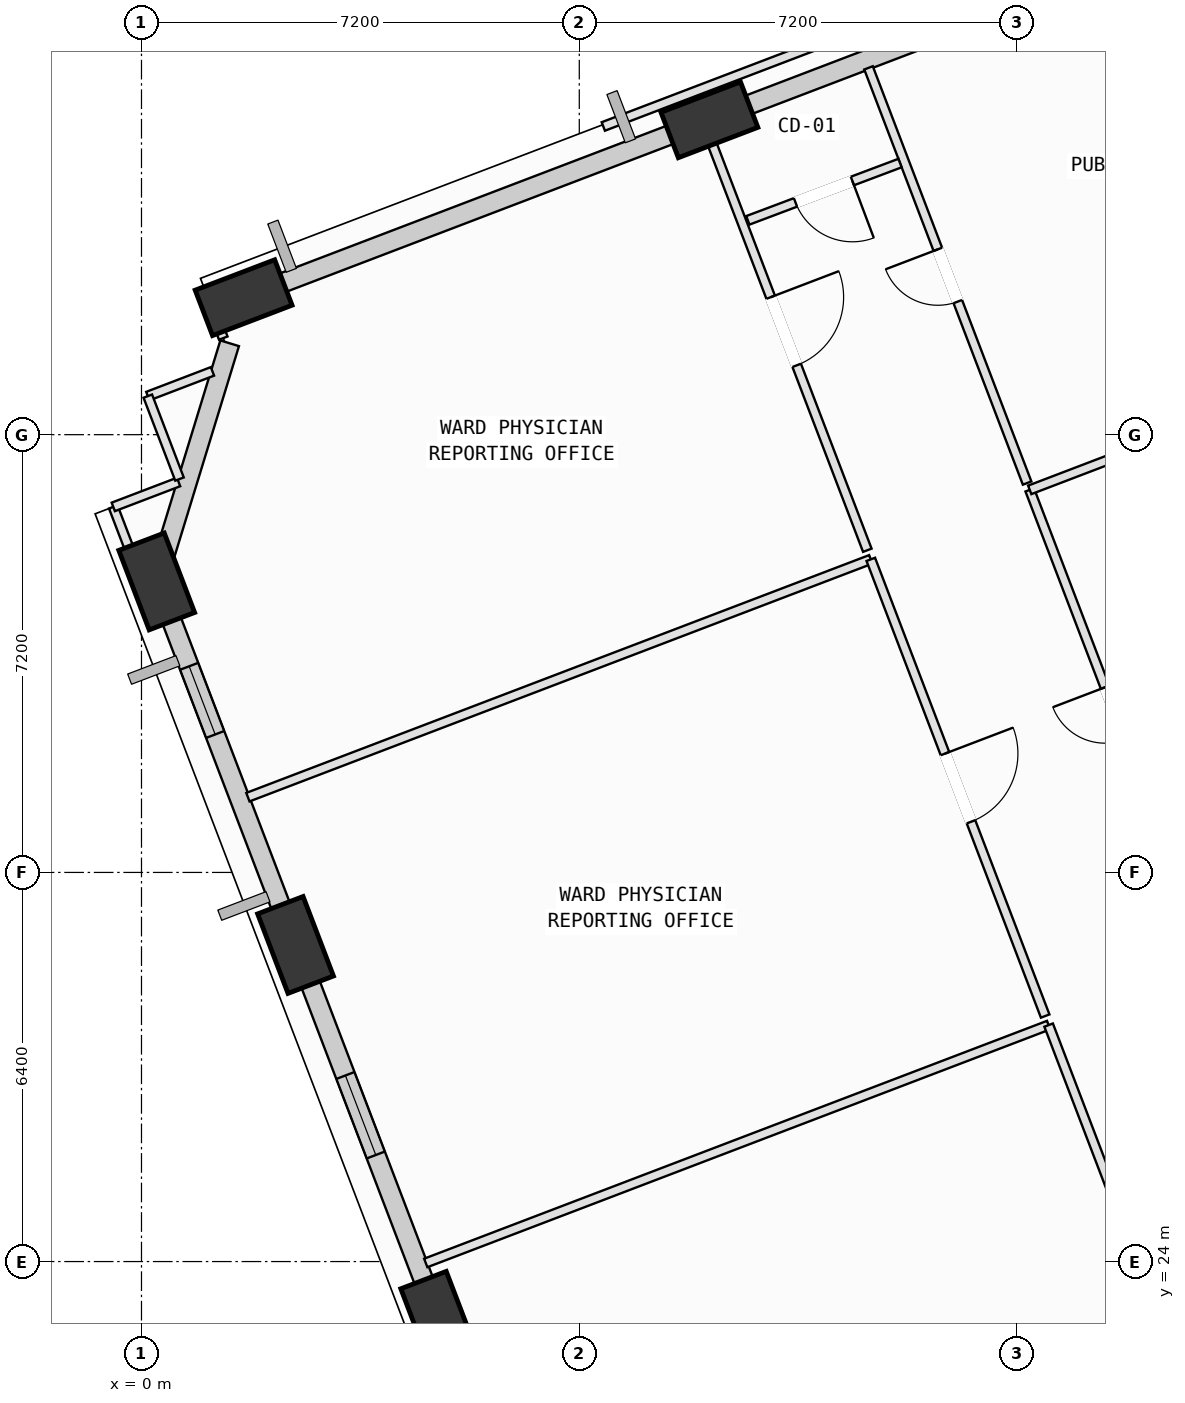
"""IFC4 building model, lengths in metres.
Left out: names, types, materials, properties, quantities, classifications, styles, units other than length and angle.
Written with IfcOpenShell. Run it as: python <this file> out.ifc"""

import sys

from ifc_helpers import new_model, si_unit, direction, frame, frame_2d, origin, origin_2d, place, context, subcontext, project, spatial, rectangle, extrude, element, fill, save


model = new_model("IFC4")
c1 = context("Model", 3, precision=1e-05, world=origin(), true_north=direction((0.0, 1.0)))
c2 = subcontext(c1, "Body", "Model", "MODEL_VIEW")
j1 = project(units=[si_unit("LENGTHUNIT", "METRE"), si_unit("PLANEANGLEUNIT", "RADIAN")], contexts=[c1])
p1 = place(None, origin())
s1 = spatial("IfcSite", under=j1, at=p1, CompositionType="ELEMENT")
p2 = place(p1, origin())
s2 = spatial("IfcBuilding", under=s1, at=p2, CompositionType="ELEMENT")
p3 = place(p2, frame((0.0, 0.0, 112.4)))
s3 = spatial("IfcBuildingStorey", under=s2, at=p3, CompositionType="ELEMENT", Elevation=112.4)
p4 = place(p3, frame((9.34, 42.778, 0.002), z_axis=(-0.07310555409, -0.100383745915, 0.992259382176), x_axis=(0.963553675807, -0.263821466154, 0.044300652763)))
e1 = element("IfcColumn", 1, at=p4, inside=s3, PredefinedType="COLUMN", context=c2, shape_type="SweptSolid", body=[
    extrude(rectangle(XDim=1.4, YDim=0.8, at=origin_2d()), origin(), (0.0, 0.0, 1.0), 4.028),
])
p5 = place(p3, frame((1.68, 39.853, 0.002), z_axis=(-0.060689479062, -0.131413274383, 0.989468209922), x_axis=(0.996122663983, -0.071226123584, 0.05163794746)))
e2 = element("IfcColumn", 2, at=p5, inside=s3, PredefinedType="COLUMN", context=c2, shape_type="SweptSolid", body=[
    extrude(rectangle(XDim=1.4, YDim=0.8, at=origin_2d()), origin(), (0.0, 0.0, 1.0), 4.039),
])
p6 = place(p3, frame((0.25, 35.186, 0.002), z_axis=(-0.041476198525, -0.137125391043, 0.989684976185), x_axis=(-0.07378339726, 0.988253126916, 0.133834851324)))
e3 = element("IfcColumn", 3, at=p6, inside=s3, PredefinedType="COLUMN", context=c2, shape_type="SweptSolid", body=[
    extrude(rectangle(XDim=1.4, YDim=0.8, at=origin_2d()), origin(), (0.0, 0.0, 1.0), 4.038),
])
p7 = place(p3, frame((2.534, 29.207, 0.002), z_axis=(-0.017083694173, -0.127885384397, 0.991641808241), x_axis=(-0.230933041621, 0.965474948457, 0.120532378182)))
e4 = element("IfcColumn", 4, at=p7, inside=s3, PredefinedType="COLUMN", context=c2, shape_type="SweptSolid", body=[
    extrude(rectangle(XDim=1.4, YDim=0.8, at=origin_2d()), origin(), (0.0, 0.0, 1.0), 4.03),
])
p8 = place(p3, frame((4.888, 23.042, 0.002), z_axis=(0.008189293553, -0.118107811468, 0.992967008687), x_axis=(-0.420049262913, 0.900736291816, 0.110601760074)))
e5 = element("IfcColumn", 5, at=p8, inside=s3, PredefinedType="COLUMN", context=c2, shape_type="SweptSolid", body=[
    extrude(rectangle(XDim=1.4, YDim=0.8, at=origin_2d()), origin(), (0.0, 0.0, 1.0), 4.025),
])
p9 = place(p3, frame((9.59, 42.874, 0.0), z_axis=(0.0, 0.0, 1.0), x_axis=(0.934201815153, 0.356744962915, 0.0)))
e6 = element("IfcWall", 6, at=p9, inside=s3, PredefinedType="SOLIDWALL", context=c2, shape_type="SweptSolid", body=[
    extrude(rectangle(XDim=7.231, YDim=0.32, at=frame_2d((3.615, 0.0))), origin(), (0.0, 0.0, 1.0), 3.165),
])
p10 = place(p3, frame((1.906, 39.94, 0.0), z_axis=(0.0, 0.0, 1.0), x_axis=(0.934209230199, 0.356725544658, 0.0)))
e7 = element("IfcWall", 7, at=p10, inside=s3, PredefinedType="SOLIDWALL", context=c2, shape_type="SweptSolid", body=[
    extrude(rectangle(XDim=7.27, YDim=0.32, at=frame_2d((3.635, 0.0))), origin(), (0.0, 0.0, 1.0), 3.165),
])
p11 = place(p3, frame((0.311, 35.384, 0.0), z_axis=(0.0, 0.0, 1.0), x_axis=(0.292819682906, 0.956167680537, 0.0)))
e8 = element("IfcWall", 8, at=p11, inside=s3, PredefinedType="SOLIDWALL", context=c2, shape_type="SweptSolid", body=[
    extrude(rectangle(XDim=3.889, YDim=0.32, at=frame_2d((1.945, 0.0))), origin(), (0.0, 0.0, 1.0), 3.165),
])
p12 = place(p3, frame((2.444, 29.443, 0.0), z_axis=(0.0, 0.0, 1.0), x_axis=(-0.356747012413, 0.934201032506, 0.0)))
e9 = element("IfcWall", 9, at=p12, inside=s3, PredefinedType="SOLIDWALL", context=c2, shape_type="SweptSolid", body=[
    extrude(rectangle(XDim=5.456, YDim=0.32, at=frame_2d((2.728, 0.0))), origin(), (0.0, 0.0, 1.0), 3.165),
])
p13 = place(p12, frame((3.454, 0.0, 0.75)))
e10 = element("IfcOpeningElement", 10, at=p13, cuts=e9, PredefinedType="OPENING", context=c2, shape_type="SweptSolid", body=[
    extrude(rectangle(XDim=1.2, YDim=1.75, at=frame_2d((0.6, 0.875))), frame((0.0, 0.17, 0.0), z_axis=(0.0, -1.0, 0.0), x_axis=(1.0, 0.0, 0.0)), (0.0, 0.0, 1.0), 0.34),
])
p14 = place(p3, frame((4.794, 23.288, 0.0), z_axis=(0.0, 0.0, 1.0), x_axis=(-0.356736674648, 0.934204980163, 0.0)))
e11 = element("IfcWall", 11, at=p14, inside=s3, PredefinedType="SOLIDWALL", context=c2, shape_type="SweptSolid", body=[
    extrude(rectangle(XDim=5.628, YDim=0.32, at=frame_2d((2.814, 0.0))), origin(), (0.0, 0.0, 1.0), 3.165),
])
p15 = place(p14, frame((2.638, 0.0, 0.75)))
e12 = element("IfcOpeningElement", 12, at=p15, cuts=e11, PredefinedType="OPENING", context=c2, shape_type="SweptSolid", body=[
    extrude(rectangle(XDim=1.4, YDim=1.85, at=frame_2d((0.7, 0.925))), frame((0.0, 0.17, 0.0), z_axis=(0.0, -1.0, 0.0), x_axis=(1.0, 0.0, 0.0)), (0.0, 0.0, 1.0), 0.34),
])
p16 = place(p3, frame((4.93, 22.287, 0.0), z_axis=(0.0, 0.0, 1.0), x_axis=(-0.356997215176, 0.9341054482, 0.0)))
e13 = element("IfcWall", 13, at=p16, inside=s3, PredefinedType="PARTITIONING", context=c2, shape_type="SweptSolid", body=[
    extrude(rectangle(XDim=0.983, YDim=0.15, at=frame_2d((0.491, 0.0))), origin(), (0.0, 0.0, 1.0), 3.165),
])
p17 = place(p3, frame((4.675, 23.977, 0.0), z_axis=(0.0, 0.0, 1.0), x_axis=(0.934201387947, 0.356746081629, 0.0)))
e14 = element("IfcWall", 14, at=p17, inside=s3, PredefinedType="PARTITIONING", context=c2, shape_type="SweptSolid", body=[
    extrude(rectangle(XDim=10.965, YDim=0.15, at=frame_2d((5.483, 0.0))), origin(), (0.0, 0.0, 1.0), 3.78),
])
p18 = place(p3, frame((14.919, 27.889, 0.0), z_axis=(0.0, 0.0, 1.0), x_axis=(0.356742665593, -0.934202692431, 0.0)))
e15 = element("IfcWall", 15, at=p18, inside=s3, PredefinedType="PARTITIONING", context=c2, shape_type="SweptSolid", body=[
    extrude(rectangle(XDim=7.824, YDim=0.15, at=frame_2d((3.912, 0.0))), origin(), (0.0, 0.0, 1.0), 3.78),
])
p19 = place(p18, frame((3.312, 0.0, 0.0)))
e16 = element("IfcOpeningElement", 16, at=p19, cuts=e15, PredefinedType="OPENING", context=c2, shape_type="SweptSolid", body=[
    extrude(rectangle(XDim=1.2, YDim=2.15, at=frame_2d((0.6, 1.075))), frame((0.0, 0.085, 0.0), z_axis=(0.0, -1.0, 0.0), x_axis=(1.0, 0.0, 0.0)), (0.0, 0.0, 1.0), 0.17),
])
p20 = place(p3, frame((1.75, 31.638, 0.0), z_axis=(0.0, 0.0, 1.0), x_axis=(0.934223647232, 0.356687786379, 0.0)))
e17 = element("IfcWall", 17, at=p20, inside=s3, PredefinedType="PARTITIONING", context=c2, shape_type="SweptSolid", body=[
    extrude(rectangle(XDim=10.965, YDim=0.15, at=frame_2d((5.482, 0.0))), origin(), (0.0, 0.0, 1.0), 3.78),
])
p21 = place(p3, frame((11.994, 35.549, 0.0), z_axis=(0.0, 0.0, 1.0), x_axis=(0.356737704726, -0.934204586815, 0.0)))
e18 = element("IfcWall", 18, at=p21, inside=s3, PredefinedType="PARTITIONING", context=c2, shape_type="SweptSolid", body=[
    extrude(rectangle(XDim=8.04, YDim=0.15, at=frame_2d((4.02, 0.0))), origin(), (0.0, 0.0, 1.0), 3.78),
])
p22 = place(p21, frame((3.42, 0.0, 0.0)))
e19 = element("IfcOpeningElement", 19, at=p22, cuts=e18, PredefinedType="OPENING", context=c2, shape_type="SweptSolid", body=[
    extrude(rectangle(XDim=1.2, YDim=2.15, at=frame_2d((0.6, 1.075))), frame((0.0, 0.085, 0.0), z_axis=(0.0, -1.0, 0.0), x_axis=(1.0, 0.0, 0.0)), (0.0, 0.0, 1.0), 0.17),
])
p23 = place(p3, frame((2.572, 28.463, 0.0), z_axis=(0.0, 0.0, 1.0), x_axis=(-0.35676603532, 0.934193767931, 0.0)))
e20 = element("IfcWall", 20, at=p23, inside=s3, PredefinedType="PARTITIONING", context=c2, shape_type="SweptSolid", body=[
    extrude(rectangle(XDim=0.961, YDim=0.15, at=frame_2d((0.481, 0.0))), origin(), (0.0, 0.0, 1.0), 3.165),
])
p24 = place(p3, frame((0.104, 38.234, 0.0), z_axis=(0.0, 0.0, 1.0), x_axis=(0.933820168523, 0.357742774712, 0.0)))
e21 = element("IfcWall", 21, at=p24, inside=s3, PredefinedType="PARTITIONING", context=c2, shape_type="SweptSolid", body=[
    extrude(rectangle(XDim=1.138, YDim=0.15, at=frame_2d((0.569, 0.0))), origin(), (0.0, 0.0, 1.0), 3.78),
])
p25 = place(p3, frame((1.345, 39.188, 0.0), z_axis=(0.0, 0.0, 1.0), x_axis=(-0.357006991696, 0.934101711742, 0.0)))
e22 = element("IfcWall", 22, at=p25, inside=s3, PredefinedType="PARTITIONING", context=c2, shape_type="SweptSolid", body=[
    extrude(rectangle(XDim=0.672, YDim=0.15, at=frame_2d((0.336, 0.0))), origin(), (0.0, 0.0, 1.0), 2.965),
])
p26 = place(p3, frame((1.105, 39.816, 0.0), z_axis=(0.0, 0.0, 1.0), x_axis=(0.934097122527, 0.357018999055, 0.0)))
e23 = element("IfcWall", 23, at=p26, inside=s3, PredefinedType="PARTITIONING", context=c2, shape_type="SweptSolid", body=[
    extrude(rectangle(XDim=0.793, YDim=0.15, at=frame_2d((0.396, 0.0))), origin(), (0.0, 0.0, 1.0), 3.78),
])
p27 = place(p3, frame((8.638, 42.693, 0.0), z_axis=(0.0, 0.0, 1.0), x_axis=(0.934382200131, 0.356272233101, 0.0)))
e24 = element("IfcWall", 24, at=p27, inside=s3, PredefinedType="PARTITIONING", context=c2, shape_type="SweptSolid", body=[
    extrude(rectangle(XDim=0.587, YDim=0.15, at=frame_2d((0.293, 0.0))), origin(), (0.0, 0.0, 1.0), 3.78),
])
p28 = place(p3, frame((9.186, 42.902, 0.0), z_axis=(0.0, 0.0, 1.0), x_axis=(0.356779945652, -0.934188455495, 0.0)))
e25 = element("IfcWall", 25, at=p28, inside=s3, PredefinedType="PARTITIONING", context=c2, shape_type="SweptSolid", body=[
    extrude(rectangle(XDim=7.71, YDim=0.15, at=frame_2d((3.855, 0.0))), origin(), (0.0, 0.0, 1.0), 2.965),
])
p29 = place(p28, frame((3.255, 0.0, 0.0)))
e26 = element("IfcOpeningElement", 26, at=p29, cuts=e25, PredefinedType="OPENING", context=c2, shape_type="SweptSolid", body=[
    extrude(rectangle(XDim=1.2, YDim=2.15, at=frame_2d((0.6, 1.075))), frame((0.0, 0.085, 0.0), z_axis=(0.0, -1.0, 0.0), x_axis=(1.0, 0.0, 0.0)), (0.0, 0.0, 1.0), 0.17),
])
p30 = place(p3, frame((0.283, 34.457, 0.0), z_axis=(0.0, 0.0, 1.0), x_axis=(-0.356945890311, 0.934125061964, 0.0)))
e27 = element("IfcWall", 27, at=p30, inside=s3, PredefinedType="PARTITIONING", context=c2, shape_type="SweptSolid", body=[
    extrude(rectangle(XDim=2.093, YDim=0.15, at=frame_2d((1.046, 0.0))), origin(), (0.0, 0.0, 1.0), 3.165),
])
p31 = place(p3, frame((-0.464, 36.412, 0.0), z_axis=(0.0, 0.0, 1.0), x_axis=(0.934289126856, 0.356516237271, 0.0)))
e28 = element("IfcWall", 28, at=p31, inside=s3, PredefinedType="PARTITIONING", context=c2, shape_type="SweptSolid", body=[
    extrude(rectangle(XDim=1.15, YDim=0.15, at=frame_2d((0.575, 0.0))), origin(), (0.0, 0.0, 1.0), 3.78),
])
p32 = place(p3, frame((0.625, 36.87, 0.0), z_axis=(0.0, 0.0, 1.0), x_axis=(-0.356871396394, 0.934153524018, 0.0)))
e29 = element("IfcWall", 29, at=p32, inside=s3, PredefinedType="PARTITIONING", context=c2, shape_type="SweptSolid", body=[
    extrude(rectangle(XDim=1.46, YDim=0.15, at=frame_2d((0.73, 0.0))), origin(), (0.0, 0.0, 1.0), 3.78),
])
p33 = place(p3, frame((17.416, 29.34, 0.0), z_axis=(0.0, 0.0, 1.0), x_axis=(-0.356818232032, 0.93417383248, 0.0)))
e30 = element("IfcWall", 30, at=p33, inside=s3, PredefinedType="PARTITIONING", context=c2, shape_type="SweptSolid", body=[
    extrude(rectangle(XDim=7.87, YDim=0.15, at=frame_2d((3.935, 0.0))), origin(), (0.0, 0.0, 1.0), 3.78),
])
p34 = place(p33, frame((3.475, 0.0, 0.0)))
e31 = element("IfcOpeningElement", 31, at=p34, cuts=e30, PredefinedType="OPENING", context=c2, shape_type="SweptSolid", body=[
    extrude(rectangle(XDim=0.92, YDim=2.1, at=frame_2d((0.46, 1.05))), frame((0.0, 0.085, 0.0), z_axis=(0.0, -1.0, 0.0), x_axis=(1.0, 0.0, 0.0)), (0.0, 0.0, 1.0), 0.17),
])
p35 = place(p3, frame((14.608, 36.692, 0.0), z_axis=(0.0, 0.0, 1.0), x_axis=(0.934216215808, 0.356707249886, 0.0)))
e32 = element("IfcWall", 32, at=p35, inside=s3, PredefinedType="PARTITIONING", context=c2, shape_type="SweptSolid", body=[
    extrude(rectangle(XDim=6.815, YDim=0.15, at=frame_2d((3.408, 0.0))), origin(), (0.0, 0.0, 1.0), 3.78),
])
p36 = place(p3, frame((14.565, 36.804, 0.0), z_axis=(0.0, 0.0, 1.0), x_axis=(-0.356753501963, 0.93419855429, 0.0)))
e33 = element("IfcWall", 33, at=p36, inside=s3, PredefinedType="PARTITIONING", context=c2, shape_type="SweptSolid", body=[
    extrude(rectangle(XDim=7.31, YDim=0.15, at=frame_2d((3.655, 0.0))), origin(), (0.0, 0.0, 1.0), 3.78),
])
p37 = place(p36, frame((3.195, 0.0, 0.0)))
e34 = element("IfcOpeningElement", 34, at=p37, cuts=e33, PredefinedType="OPENING", context=c2, shape_type="SweptSolid", body=[
    extrude(rectangle(XDim=0.92, YDim=2.1, at=frame_2d((0.46, 1.05))), frame((0.0, 0.085, 0.0), z_axis=(0.0, -1.0, 0.0), x_axis=(1.0, 0.0, 0.0)), (0.0, 0.0, 1.0), 0.17),
])
p38 = place(p3, frame((12.475, 42.067, 0.0), z_axis=(0.0, 0.0, 1.0), x_axis=(-0.93593469175, -0.352173611701, 0.0)))
e35 = element("IfcWall", 35, at=p38, inside=s3, PredefinedType="PARTITIONING", context=c2, shape_type="SweptSolid", body=[
    extrude(rectangle(XDim=2.675, YDim=0.15, at=frame_2d((1.337, 0.0))), origin(), (0.0, 0.0, 1.0), 3.78),
])
p39 = place(p38, frame((0.837, 0.0, 0.0)))
e36 = element("IfcOpeningElement", 36, at=p39, cuts=e35, PredefinedType="OPENING", context=c2, shape_type="SweptSolid", body=[
    extrude(rectangle(XDim=1.0, YDim=2.12, at=frame_2d((0.5, 1.06))), frame((0.0, 0.085, 0.0), z_axis=(0.0, -1.0, 0.0), x_axis=(1.0, 0.0, 0.0)), (0.0, 0.0, 1.0), 0.17),
])
p40 = place(p3, frame((7.595, 42.669, 0.0), z_axis=(0.0, 0.0, 1.0), x_axis=(0.934230756323, 0.35666916595, 0.0)))
e37 = element("IfcWall", 37, at=p40, inside=s3, PredefinedType="PARTITIONING", context=c2, shape_type="SweptSolid", body=[
    extrude(rectangle(XDim=5.74, YDim=0.15, at=frame_2d((2.87, 0.0))), origin(), (0.0, 0.0, 1.0), 3.78),
])
p41 = place(p13, origin())
e38 = element("IfcWindow", 38, at=p41, inside=s3, PartitioningType="SINGLE_PANEL", PredefinedType="WINDOW", context=c2, shape_type="SweptSolid", body=[
    extrude(rectangle(XDim=1.2, YDim=1.75, at=frame_2d((0.6, 0.875))), frame((0.0, 0.03, 0.0), z_axis=(0.0, -1.0, 0.0), x_axis=(1.0, 0.0, 0.0)), (0.0, 0.0, 1.0), 0.06),
])
fill(e10, e38)
p42 = place(p15, origin())
e39 = element("IfcWindow", 39, at=p42, inside=s3, PartitioningType="SINGLE_PANEL", PredefinedType="WINDOW", context=c2, shape_type="SweptSolid", body=[
    extrude(rectangle(XDim=1.4, YDim=1.85, at=frame_2d((0.7, 0.925))), frame((0.0, 0.03, 0.0), z_axis=(0.0, -1.0, 0.0), x_axis=(1.0, 0.0, 0.0)), (0.0, 0.0, 1.0), 0.06),
])
fill(e12, e39)
p43 = place(p22, origin())
e40 = element("IfcDoor", 40, at=p43, inside=s3, OperationType="SINGLE_SWING_LEFT", PredefinedType="DOOR", context=c2, shape_type="SweptSolid", body=[
    extrude(rectangle(XDim=1.2, YDim=2.15, at=frame_2d((0.6, 1.075))), frame((0.0, 0.025, 0.0), z_axis=(0.0, -1.0, 0.0), x_axis=(1.0, 0.0, 0.0)), (0.0, 0.0, 1.0), 0.05),
])
fill(e19, e40)
p44 = place(p29, origin())
e41 = element("IfcDoor", 41, at=p44, inside=s3, OperationType="SINGLE_SWING_LEFT", PredefinedType="DOOR", context=c2, shape_type="SweptSolid", body=[
    extrude(rectangle(XDim=1.2, YDim=2.15, at=frame_2d((0.6, 1.075))), frame((0.0, 0.025, 0.0), z_axis=(0.0, -1.0, 0.0), x_axis=(1.0, 0.0, 0.0)), (0.0, 0.0, 1.0), 0.05),
])
fill(e26, e41)
p45 = place(p34, origin())
e42 = element("IfcDoor", 42, at=p45, inside=s3, OperationType="SINGLE_SWING_RIGHT", PredefinedType="DOOR", context=c2, shape_type="SweptSolid", body=[
    extrude(rectangle(XDim=0.92, YDim=2.1, at=frame_2d((0.46, 1.05))), frame((0.0, 0.025, 0.0), z_axis=(0.0, -1.0, 0.0), x_axis=(1.0, 0.0, 0.0)), (0.0, 0.0, 1.0), 0.05),
])
fill(e31, e42)
p46 = place(p37, origin())
e43 = element("IfcDoor", 43, at=p46, inside=s3, OperationType="SINGLE_SWING_RIGHT", PredefinedType="DOOR", context=c2, shape_type="SweptSolid", body=[
    extrude(rectangle(XDim=0.92, YDim=2.1, at=frame_2d((0.46, 1.05))), frame((0.0, 0.025, 0.0), z_axis=(0.0, -1.0, 0.0), x_axis=(1.0, 0.0, 0.0)), (0.0, 0.0, 1.0), 0.05),
])
fill(e34, e43)
p47 = place(p39, origin())
e44 = element("IfcDoor", 44, at=p47, inside=s3, OperationType="SINGLE_SWING_LEFT", PredefinedType="DOOR", context=c2, shape_type="SweptSolid", body=[
    extrude(rectangle(XDim=1.0, YDim=2.12, at=frame_2d((0.5, 1.06))), frame((0.0, 0.025, 0.0), z_axis=(0.0, -1.0, 0.0), x_axis=(1.0, 0.0, 0.0)), (0.0, 0.0, 1.0), 0.05),
])
fill(e36, e44)
save(model, sys.argv[1])
